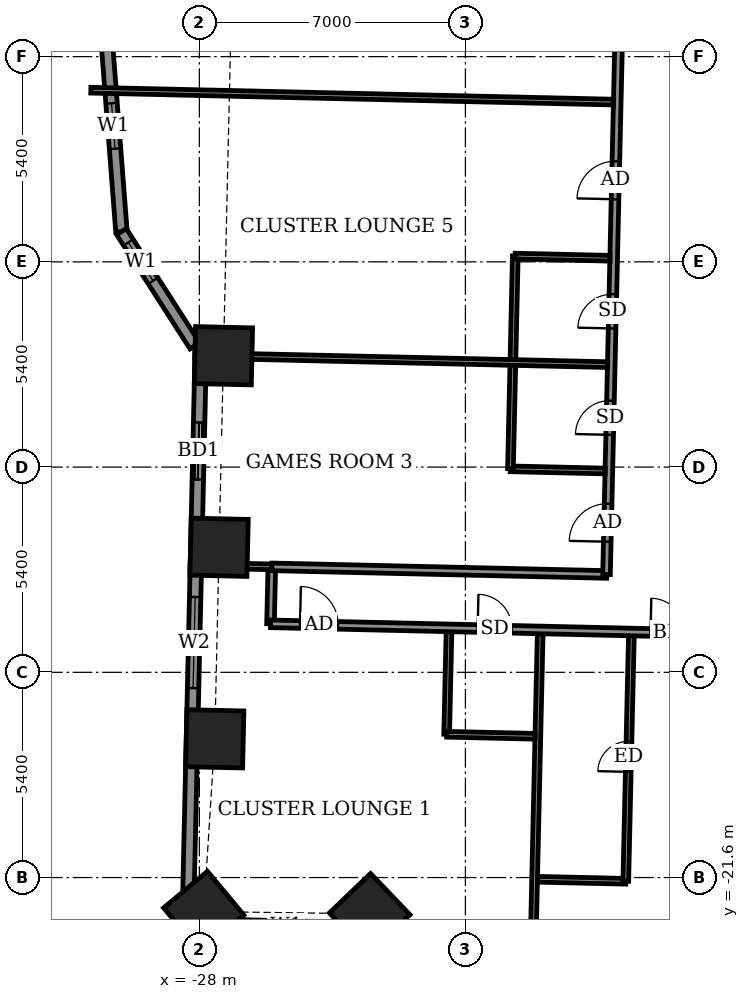
"""IFC4 building model, lengths in metres.
Left out: names, types, materials, properties, quantities, classifications, styles, units other than length and angle.
Written with IfcOpenShell. Run it as: python <this file> out.ifc"""

import sys

from ifc_helpers import new_model, si_unit, direction, frame, frame_2d, origin, origin_2d, place, context, subcontext, project, spatial, rectangle, extrude, element, fill, save


model = new_model("IFC4")
c1 = context("Model", 3, precision=1e-05, world=origin(), true_north=direction((0.0, 1.0)))
c2 = subcontext(c1, "Body", "Model", "MODEL_VIEW")
j1 = project(units=[si_unit("LENGTHUNIT", "METRE"), si_unit("PLANEANGLEUNIT", "RADIAN")], contexts=[c1])
p1 = place(None, origin())
s1 = spatial("IfcSite", under=j1, at=p1, CompositionType="ELEMENT")
p2 = place(p1, origin())
s2 = spatial("IfcBuilding", under=s1, at=p2, CompositionType="ELEMENT")
p3 = place(p2, frame((0.0, 0.0, 60.3)))
s3 = spatial("IfcBuildingStorey", under=s2, at=p3, CompositionType="ELEMENT", Elevation=60.3)
for number, where, z_axis, x_axis in (
    (1, (-27.366, -7.87, -0.55), (0.0, 0.0, 1.0), (-0.023, -1.0, 0.0)),
    (2, (-27.481, -12.91, -0.55), (0.0, 0.0, 1.0), (-0.023, -1.0, 0.0)),
    (3, (-27.595, -17.95, -0.55), (0.0, 0.0, 1.0), (-0.023, -1.0, 0.0)),
    (4, (-27.884, -22.494, -0.55), (0.0, 0.0, 1.0), (0.64, -0.768, 0.0)),
    (5, (-23.519, -22.555, -0.55), (0.0, 0.0, 1.0), (0.691, -0.723, 0.0)),
):
    element("IfcColumn", number, at=place(p3, frame(where, z_axis=z_axis, x_axis=x_axis)), inside=s3, PredefinedType="COLUMN", context=c2, shape_type="SweptSolid", body=[
        extrude(rectangle(XDim=1.5, YDim=1.5, at=origin_2d()), origin(), (0.0, 0.0, 1.0), 3.6),
    ])
p4 = place(p3, frame((-30.479, 0.952, 0.0), z_axis=(0.0, 0.0, 1.0), x_axis=(0.076964476481, -0.997033835614, 0.0)))
e6 = element("IfcWall", 6, at=p4, inside=s3, PredefinedType="SOLIDWALL", context=c2, shape_type="SweptSolid", body=[
    extrude(rectangle(XDim=5.573, YDim=0.3, at=frame_2d((2.787, 0.0))), origin(), (0.0, 0.0, 1.0), 3.05),
])
p5 = place(p4, frame((2.186, 0.0, 0.9)))
e7 = element("IfcOpeningElement", 7, at=p5, cuts=e6, PredefinedType="OPENING", context=c2, shape_type="SweptSolid", body=[
    extrude(rectangle(XDim=1.2, YDim=1.5, at=frame_2d((0.6, 0.75))), frame((0.0, 0.16, 0.0), z_axis=(0.0, -1.0, 0.0), x_axis=(1.0, 0.0, 0.0)), (0.0, 0.0, 1.0), 0.32),
])
p6 = place(p3, frame((-30.05, -4.605, 0.0), z_axis=(0.0, 0.0, 1.0), x_axis=(0.540653885242, -0.841245134532, 0.0)))
e8 = element("IfcWall", 8, at=p6, inside=s3, PredefinedType="SOLIDWALL", context=c2, shape_type="SweptSolid", body=[
    extrude(rectangle(XDim=3.57, YDim=0.3, at=frame_2d((1.785, 0.0))), origin(), (0.0, 0.0, 1.0), 3.05),
])
p7 = place(p6, frame((0.338, 0.0, 0.9)))
e9 = element("IfcOpeningElement", 9, at=p7, cuts=e8, PredefinedType="OPENING", context=c2, shape_type="SweptSolid", body=[
    extrude(rectangle(XDim=1.2, YDim=1.5, at=frame_2d((0.6, 0.75))), frame((0.0, 0.16, 0.0), z_axis=(0.0, -1.0, 0.0), x_axis=(1.0, 0.0, 0.0)), (0.0, 0.0, 1.0), 0.32),
])
p8 = place(p3, frame((-27.965, -7.802, 0.0), z_axis=(0.0, 0.0, 1.0), x_axis=(-0.02267786199, -0.999742824218, 0.0)))
e10 = element("IfcWall", 10, at=p8, inside=s3, PredefinedType="SOLIDWALL", context=c2, shape_type="SweptSolid", body=[
    extrude(rectangle(XDim=15.029, YDim=0.3, at=frame_2d((7.514, 0.0))), origin(), (0.0, 0.0, 1.0), 3.05),
])
p9 = place(p8, frame((1.826, 0.0, 0.0)))
e11 = element("IfcOpeningElement", 11, at=p9, cuts=e10, PredefinedType="OPENING", context=c2, shape_type="SweptSolid", body=[
    extrude(rectangle(XDim=1.5, YDim=2.4, at=frame_2d((0.75, 1.2))), frame((0.0, 0.16, 0.0), z_axis=(0.0, -1.0, 0.0), x_axis=(1.0, 0.0, 0.0)), (0.0, 0.0, 1.0), 0.32),
])
p10 = place(p8, frame((6.417, 0.0, 0.9)))
e12 = element("IfcOpeningElement", 12, at=p10, cuts=e10, PredefinedType="OPENING", context=c2, shape_type="SweptSolid", body=[
    extrude(rectangle(XDim=2.4, YDim=1.5, at=frame_2d((1.2, 0.75))), frame((0.0, 0.16, 0.0), z_axis=(0.0, -1.0, 0.0), x_axis=(1.0, 0.0, 0.0)), (0.0, 0.0, 1.0), 0.32),
])
p11 = place(p3, frame((-28.306, -22.827, 0.0), z_axis=(0.0, 0.0, 1.0), x_axis=(0.999741204967, -0.022749133868, 0.0)))
e13 = element("IfcWall", 13, at=p11, inside=s3, PredefinedType="SOLIDWALL", context=c2, shape_type="SweptSolid", body=[
    extrude(rectangle(XDim=4.4, YDim=0.3, at=frame_2d((2.2, 0.0))), origin(), (0.0, 0.0, 1.0), 3.05),
])
p12 = place(p11, frame((1.996, 0.0, 0.9)))
e14 = element("IfcOpeningElement", 14, at=p12, cuts=e13, PredefinedType="OPENING", context=c2, shape_type="SweptSolid", body=[
    extrude(rectangle(XDim=1.2, YDim=1.5, at=frame_2d((0.6, 0.75))), frame((0.0, 0.16, 0.0), z_axis=(0.0, -1.0, 0.0), x_axis=(1.0, 0.0, 0.0)), (0.0, 0.0, 1.0), 0.32),
])
p13 = place(p3, frame((-30.802, -10.917, 0.0), z_axis=(0.0, 0.0, 1.0), x_axis=(0.022929749512, 0.99973707873, 0.0)))
e15 = element("IfcWall", 15, at=p13, inside=s3, PredefinedType="USERDEFINED", context=c2, shape_type="SweptSolid", body=[
    extrude(rectangle(XDim=2.875, YDim=0.55, at=frame_2d((1.438, 0.0))), origin(), (0.0, 0.0, 1.0), 0.8),
])
p14 = place(p3, frame((-19.307, -27.283, 0.0), z_axis=(0.0, 0.0, 1.0), x_axis=(0.022717280737, 0.999741929278, 0.0)))
e16 = element("IfcWall", 16, at=p14, inside=s3, PredefinedType="PARTITIONING", context=c2, shape_type="SweptSolid", body=[
    extrude(rectangle(XDim=12.101, YDim=0.15, at=frame_2d((6.051, 0.0))), origin(), (0.0, 0.0, 1.0), 2.55),
])
p15 = place(p3, frame((-19.102, -21.645, 0.0), z_axis=(0.0, 0.0, 1.0), x_axis=(0.999740260747, -0.02279059109, 0.0)))
e17 = element("IfcWall", 17, at=p15, inside=s3, PredefinedType="PARTITIONING", context=c2, shape_type="SweptSolid", body=[
    extrude(rectangle(XDim=2.324, YDim=0.15, at=frame_2d((1.162, 0.0))), origin(), (0.0, 0.0, 1.0), 3.05),
])
p16 = place(p3, frame((-16.78, -21.698, 0.0), z_axis=(0.0, 0.0, 1.0), x_axis=(0.022752312182, 0.999741132639, 0.0)))
e18 = element("IfcWall", 18, at=p16, inside=s3, PredefinedType="PARTITIONING", context=c2, shape_type="SweptSolid", body=[
    extrude(rectangle(XDim=6.46, YDim=0.15, at=frame_2d((3.23, 0.0))), origin(), (0.0, 0.0, 1.0), 3.05),
])
p17 = place(p16, frame((2.88, 0.0, 0.0)))
e19 = element("IfcOpeningElement", 19, at=p17, cuts=e18, PredefinedType="OPENING", context=c2, shape_type="SweptSolid", body=[
    extrude(rectangle(XDim=0.8, YDim=2.1, at=frame_2d((0.4, 1.05))), frame((0.0, 0.085, 0.0), z_axis=(0.0, -1.0, 0.0), x_axis=(1.0, 0.0, 0.0)), (0.0, 0.0, 1.0), 0.17),
])
p18 = place(p3, frame((-21.493, -17.83, 0.0), z_axis=(0.0, 0.0, 1.0), x_axis=(0.02260842146, 0.999744396973, 0.0)))
e20 = element("IfcWall", 20, at=p18, inside=s3, PredefinedType="PARTITIONING", context=c2, shape_type="SweptSolid", body=[
    extrude(rectangle(XDim=2.7, YDim=0.15, at=frame_2d((1.35, 0.0))), origin(), (0.0, 0.0, 1.0), 3.05),
])
p19 = place(p3, frame((-21.491, -17.83, 0.0), z_axis=(0.0, 0.0, 1.0), x_axis=(0.999740260747, -0.02279059109, 0.0)))
e21 = element("IfcWall", 21, at=p19, inside=s3, PredefinedType="PARTITIONING", context=c2, shape_type="SweptSolid", body=[
    extrude(rectangle(XDim=2.324, YDim=0.15, at=frame_2d((1.162, 0.0))), origin(), (0.0, 0.0, 1.0), 3.05),
])
p20 = place(p3, frame((-26.128, -14.924, 0.0), z_axis=(0.0, 0.0, 1.0), x_axis=(0.022632637625, 0.99974384905, 0.0)))
e22 = element("IfcWall", 22, at=p20, inside=s3, PredefinedType="PARTITIONING", context=c2, shape_type="SweptSolid", body=[
    extrude(rectangle(XDim=1.5, YDim=0.2, at=frame_2d((0.75, 0.0))), origin(), (0.0, 0.0, 1.0), 3.05),
])
p21 = place(p3, frame((-26.126, -14.924, 0.0), z_axis=(0.0, 0.0, 1.0), x_axis=(0.999742687583, -0.0226838847, 0.0)))
e23 = element("IfcWall", 23, at=p21, inside=s3, PredefinedType="PARTITIONING", context=c2, shape_type="SweptSolid", body=[
    extrude(rectangle(XDim=54.836, YDim=0.2, at=frame_2d((27.418, 0.0))), origin(), (0.0, 0.0, 1.0), 3.05),
])
p22 = place(p21, frame((0.775, 0.0, 0.0)))
e24 = element("IfcOpeningElement", 24, at=p22, cuts=e23, PredefinedType="OPENING", context=c2, shape_type="SweptSolid", body=[
    extrude(rectangle(XDim=1.0, YDim=2.1, at=frame_2d((0.5, 1.05))), frame((0.0, 0.11, 0.0), z_axis=(0.0, -1.0, 0.0), x_axis=(1.0, 0.0, 0.0)), (0.0, 0.0, 1.0), 0.22),
])
p23 = place(p21, frame((5.45, 0.0, 0.0)))
e25 = element("IfcOpeningElement", 25, at=p23, cuts=e23, PredefinedType="OPENING", context=c2, shape_type="SweptSolid", body=[
    extrude(rectangle(XDim=0.9, YDim=2.1, at=frame_2d((0.45, 1.05))), frame((0.0, 0.11, 0.0), z_axis=(0.0, -1.0, 0.0), x_axis=(1.0, 0.0, 0.0)), (0.0, 0.0, 1.0), 0.22),
])
p24 = place(p21, frame((10.0, 0.0, 0.0)))
e26 = element("IfcOpeningElement", 26, at=p24, cuts=e23, PredefinedType="OPENING", context=c2, shape_type="SweptSolid", body=[
    extrude(rectangle(XDim=0.9, YDim=2.1, at=frame_2d((0.45, 1.05))), frame((0.0, 0.11, 0.0), z_axis=(0.0, -1.0, 0.0), x_axis=(1.0, 0.0, 0.0)), (0.0, 0.0, 1.0), 0.22),
])
p25 = place(p21, frame((11.975, 0.0, 0.0)))
e27 = element("IfcOpeningElement", 27, at=p25, cuts=e23, PredefinedType="OPENING", context=c2, shape_type="SweptSolid", body=[
    extrude(rectangle(XDim=0.9, YDim=2.1, at=frame_2d((0.45, 1.05))), frame((0.0, 0.11, 0.0), z_axis=(0.0, -1.0, 0.0), x_axis=(1.0, 0.0, 0.0)), (0.0, 0.0, 1.0), 0.22),
])
p26 = place(p21, frame((18.85, 0.0, 0.0)))
e28 = element("IfcOpeningElement", 28, at=p26, cuts=e23, PredefinedType="OPENING", context=c2, shape_type="SweptSolid", body=[
    extrude(rectangle(XDim=0.9, YDim=2.1, at=frame_2d((0.45, 1.05))), frame((0.0, 0.11, 0.0), z_axis=(0.0, -1.0, 0.0), x_axis=(1.0, 0.0, 0.0)), (0.0, 0.0, 1.0), 0.22),
])
p27 = place(p21, frame((20.9, 0.0, 0.0)))
e29 = element("IfcOpeningElement", 29, at=p27, cuts=e23, PredefinedType="OPENING", context=c2, shape_type="SweptSolid", body=[
    extrude(rectangle(XDim=0.9, YDim=2.1, at=frame_2d((0.45, 1.05))), frame((0.0, 0.11, 0.0), z_axis=(0.0, -1.0, 0.0), x_axis=(1.0, 0.0, 0.0)), (0.0, 0.0, 1.0), 0.22),
])
p28 = place(p21, frame((27.725, 0.0, 0.0)))
e30 = element("IfcOpeningElement", 30, at=p28, cuts=e23, PredefinedType="OPENING", context=c2, shape_type="SweptSolid", body=[
    extrude(rectangle(XDim=0.9, YDim=2.1, at=frame_2d((0.45, 1.05))), frame((0.0, 0.11, 0.0), z_axis=(0.0, -1.0, 0.0), x_axis=(1.0, 0.0, 0.0)), (0.0, 0.0, 1.0), 0.22),
])
p29 = place(p21, frame((29.7, 0.0, 0.0)))
e31 = element("IfcOpeningElement", 31, at=p29, cuts=e23, PredefinedType="OPENING", context=c2, shape_type="SweptSolid", body=[
    extrude(rectangle(XDim=0.9, YDim=2.1, at=frame_2d((0.45, 1.05))), frame((0.0, 0.11, 0.0), z_axis=(0.0, -1.0, 0.0), x_axis=(1.0, 0.0, 0.0)), (0.0, 0.0, 1.0), 0.22),
])
p30 = place(p21, frame((36.5, 0.0, 0.0)))
e32 = element("IfcOpeningElement", 32, at=p30, cuts=e23, PredefinedType="OPENING", context=c2, shape_type="SweptSolid", body=[
    extrude(rectangle(XDim=0.9, YDim=2.1, at=frame_2d((0.45, 1.05))), frame((0.0, 0.11, 0.0), z_axis=(0.0, -1.0, 0.0), x_axis=(1.0, 0.0, 0.0)), (0.0, 0.0, 1.0), 0.22),
])
p31 = place(p21, frame((38.525, 0.0, 0.0)))
e33 = element("IfcOpeningElement", 33, at=p31, cuts=e23, PredefinedType="OPENING", context=c2, shape_type="SweptSolid", body=[
    extrude(rectangle(XDim=0.9, YDim=2.1, at=frame_2d((0.45, 1.05))), frame((0.0, 0.11, 0.0), z_axis=(0.0, -1.0, 0.0), x_axis=(1.0, 0.0, 0.0)), (0.0, 0.0, 1.0), 0.22),
])
p32 = place(p21, frame((45.325, 0.0, 0.0)))
e34 = element("IfcOpeningElement", 34, at=p32, cuts=e23, PredefinedType="OPENING", context=c2, shape_type="SweptSolid", body=[
    extrude(rectangle(XDim=0.9, YDim=2.1, at=frame_2d((0.45, 1.05))), frame((0.0, 0.11, 0.0), z_axis=(0.0, -1.0, 0.0), x_axis=(1.0, 0.0, 0.0)), (0.0, 0.0, 1.0), 0.22),
])
p33 = place(p21, frame((52.593, 0.0, 0.0)))
e35 = element("IfcOpeningElement", 35, at=p33, cuts=e23, PredefinedType="OPENING", context=c2, shape_type="SweptSolid", body=[
    extrude(rectangle(XDim=1.0, YDim=2.1, at=frame_2d((0.5, 1.05))), frame((0.0, 0.11, 0.0), z_axis=(0.0, -1.0, 0.0), x_axis=(1.0, 0.0, 0.0)), (0.0, 0.0, 1.0), 0.22),
])
p34 = place(p21, frame((47.55, 0.0, 0.0)))
e36 = element("IfcOpeningElement", 36, at=p34, cuts=e23, PredefinedType="OPENING", context=c2, shape_type="SweptSolid", body=[
    extrude(rectangle(XDim=0.9, YDim=2.1, at=frame_2d((0.45, 1.05))), frame((0.0, 0.11, 0.0), z_axis=(0.0, -1.0, 0.0), x_axis=(1.0, 0.0, 0.0)), (0.0, 0.0, 1.0), 0.22),
])
p35 = place(p3, frame((-28.242, -13.376, 0.0), z_axis=(0.0, 0.0, 1.0), x_axis=(0.999739603527, -0.022819402715, 0.0)))
e37 = element("IfcWall", 37, at=p35, inside=s3, PredefinedType="PARTITIONING", context=c2, shape_type="SweptSolid", body=[
    extrude(rectangle(XDim=2.15, YDim=0.15, at=frame_2d((1.075, 0.0))), origin(), (0.0, 0.0, 1.0), 3.05),
])
p36 = place(p3, frame((-26.092, -13.425, 0.0), z_axis=(0.0, 0.0, 1.0), x_axis=(0.999742550188, -0.022689939273, 0.0)))
e38 = element("IfcWall", 38, at=p36, inside=s3, PredefinedType="PARTITIONING", context=c2, shape_type="SweptSolid", body=[
    extrude(rectangle(XDim=8.812, YDim=0.2, at=frame_2d((4.406, 0.0))), origin(), (0.0, 0.0, 1.0), 3.05),
])
p37 = place(p3, frame((-17.287, -13.625, 0.0), z_axis=(0.0, 0.0, 1.0), x_axis=(0.022712214871, 0.999742044377, 0.0)))
e39 = element("IfcWall", 39, at=p37, inside=s3, PredefinedType="PARTITIONING", context=c2, shape_type="SweptSolid", body=[
    extrude(rectangle(XDim=26.551, YDim=0.2, at=frame_2d((13.275, 0.0))), origin(), (0.0, 0.0, 1.0), 3.05),
])
p38 = place(p37, frame((14.15, 0.0, 0.0)))
e40 = element("IfcOpeningElement", 40, at=p38, cuts=e39, PredefinedType="OPENING", context=c2, shape_type="SweptSolid", body=[
    extrude(rectangle(XDim=1.0, YDim=2.1, at=frame_2d((0.5, 1.05))), frame((0.0, 0.11, 0.0), z_axis=(0.0, -1.0, 0.0), x_axis=(1.0, 0.0, 0.0)), (0.0, 0.0, 1.0), 0.22),
])
p39 = place(p37, frame((17.625, 0.0, 0.0)))
e41 = element("IfcOpeningElement", 41, at=p39, cuts=e39, PredefinedType="OPENING", context=c2, shape_type="SweptSolid", body=[
    extrude(rectangle(XDim=0.9, YDim=2.1, at=frame_2d((0.45, 1.05))), frame((0.0, 0.11, 0.0), z_axis=(0.0, -1.0, 0.0), x_axis=(1.0, 0.0, 0.0)), (0.0, 0.0, 1.0), 0.22),
])
p40 = place(p37, frame((9.875, 0.0, 0.0)))
e42 = element("IfcOpeningElement", 42, at=p40, cuts=e39, PredefinedType="OPENING", context=c2, shape_type="SweptSolid", body=[
    extrude(rectangle(XDim=1.0, YDim=2.1, at=frame_2d((0.5, 1.05))), frame((0.0, 0.11, 0.0), z_axis=(0.0, -1.0, 0.0), x_axis=(1.0, 0.0, 0.0)), (0.0, 0.0, 1.0), 0.22),
])
p41 = place(p37, frame((6.475, 0.0, 0.0)))
e43 = element("IfcOpeningElement", 43, at=p41, cuts=e39, PredefinedType="OPENING", context=c2, shape_type="SweptSolid", body=[
    extrude(rectangle(XDim=0.9, YDim=2.1, at=frame_2d((0.45, 1.05))), frame((0.0, 0.11, 0.0), z_axis=(0.0, -1.0, 0.0), x_axis=(1.0, 0.0, 0.0)), (0.0, 0.0, 1.0), 0.22),
])
p42 = place(p37, frame((0.862, 0.0, 0.0)))
e44 = element("IfcOpeningElement", 44, at=p42, cuts=e39, PredefinedType="OPENING", context=c2, shape_type="SweptSolid", body=[
    extrude(rectangle(XDim=1.0, YDim=2.1, at=frame_2d((0.5, 1.05))), frame((0.0, 0.11, 0.0), z_axis=(0.0, -1.0, 0.0), x_axis=(1.0, 0.0, 0.0)), (0.0, 0.0, 1.0), 0.22),
])
p43 = place(p37, frame((3.675, 0.0, 0.0)))
e45 = element("IfcOpeningElement", 45, at=p43, cuts=e39, PredefinedType="OPENING", context=c2, shape_type="SweptSolid", body=[
    extrude(rectangle(XDim=0.9, YDim=2.1, at=frame_2d((0.45, 1.05))), frame((0.0, 0.11, 0.0), z_axis=(0.0, -1.0, 0.0), x_axis=(1.0, 0.0, 0.0)), (0.0, 0.0, 1.0), 0.22),
])
p44 = place(p3, frame((-19.819, -10.846, 0.0), z_axis=(0.0, 0.0, 1.0), x_axis=(0.999738801317, -0.022854521249, 0.0)))
e46 = element("IfcWall", 46, at=p44, inside=s3, PredefinedType="PARTITIONING", context=c2, shape_type="SweptSolid", body=[
    extrude(rectangle(XDim=2.5, YDim=0.15, at=frame_2d((1.25, 0.0))), origin(), (0.0, 0.0, 1.0), 3.05),
])
p45 = place(p3, frame((-19.814, -10.842, 0.0), z_axis=(0.0, 0.0, 1.0), x_axis=(0.022667933447, 0.999743049385, 0.0)))
e47 = element("IfcWall", 47, at=p45, inside=s3, PredefinedType="PARTITIONING", context=c2, shape_type="SweptSolid", body=[
    extrude(rectangle(XDim=5.601, YDim=0.15, at=frame_2d((2.8, 0.0))), origin(), (0.0, 0.0, 1.0), 3.05),
])
p46 = place(p3, frame((-28.116, -7.857, 0.0), z_axis=(0.0, 0.0, 1.0), x_axis=(0.999741301527, -0.022744890004, 0.0)))
e48 = element("IfcWall", 48, at=p46, inside=s3, PredefinedType="PARTITIONING", context=c2, shape_type="SweptSolid", body=[
    extrude(rectangle(XDim=10.863, YDim=0.15, at=frame_2d((5.431, 0.0))), origin(), (0.0, 0.0, 1.0), 3.05),
])
p47 = place(p3, frame((-19.692, -5.248, 0.0), z_axis=(0.0, 0.0, 1.0), x_axis=(0.999740977561, -0.022759125332, 0.0)))
e49 = element("IfcWall", 49, at=p47, inside=s3, PredefinedType="PARTITIONING", context=c2, shape_type="SweptSolid", body=[
    extrude(rectangle(XDim=2.5, YDim=0.15, at=frame_2d((1.25, 0.0))), origin(), (0.0, 0.0, 1.0), 3.05),
])
p48 = place(p3, frame((-30.856, -0.883, 0.0), z_axis=(0.0, 0.0, 1.0), x_axis=(0.999741248952, -0.022747200787, 0.0)))
e50 = element("IfcWall", 50, at=p48, inside=s3, PredefinedType="PARTITIONING", context=c2, shape_type="SweptSolid", body=[
    extrude(rectangle(XDim=13.76, YDim=0.15, at=frame_2d((6.88, 0.0))), origin(), (0.0, 0.0, 1.0), 2.05),
])
p49 = place(p5, origin())
e51 = element("IfcWindow", 51, at=p49, inside=s3, PartitioningType="SINGLE_PANEL", PredefinedType="WINDOW", context=c2, shape_type="SweptSolid", body=[
    extrude(rectangle(XDim=1.2, YDim=1.5, at=frame_2d((0.6, 0.75))), frame((0.0, 0.03, 0.0), z_axis=(0.0, -1.0, 0.0), x_axis=(1.0, 0.0, 0.0)), (0.0, 0.0, 1.0), 0.06),
])
fill(e7, e51)
p50 = place(p7, origin())
e52 = element("IfcWindow", 52, at=p50, inside=s3, PartitioningType="SINGLE_PANEL", PredefinedType="WINDOW", context=c2, shape_type="SweptSolid", body=[
    extrude(rectangle(XDim=1.2, YDim=1.5, at=frame_2d((0.6, 0.75))), frame((0.0, 0.03, 0.0), z_axis=(0.0, -1.0, 0.0), x_axis=(1.0, 0.0, 0.0)), (0.0, 0.0, 1.0), 0.06),
])
fill(e9, e52)
p51 = place(p9, origin())
e53 = element("IfcDoor", 53, at=p51, inside=s3, OperationType="SLIDING_TO_LEFT", PredefinedType="DOOR", context=c2, shape_type="SweptSolid", body=[
    extrude(rectangle(XDim=1.5, YDim=2.4, at=frame_2d((0.75, 1.2))), frame((0.0, 0.025, 0.0), z_axis=(0.0, -1.0, 0.0), x_axis=(1.0, 0.0, 0.0)), (0.0, 0.0, 1.0), 0.05),
])
fill(e11, e53)
p52 = place(p10, origin())
e54 = element("IfcWindow", 54, at=p52, inside=s3, PartitioningType="DOUBLE_PANEL_VERTICAL", PredefinedType="WINDOW", context=c2, shape_type="SweptSolid", body=[
    extrude(rectangle(XDim=2.4, YDim=1.5, at=frame_2d((1.2, 0.75))), frame((0.0, 0.03, 0.0), z_axis=(0.0, -1.0, 0.0), x_axis=(1.0, 0.0, 0.0)), (0.0, 0.0, 1.0), 0.06),
])
fill(e12, e54)
p53 = place(p22, origin())
e55 = element("IfcDoor", 55, at=p53, inside=s3, OperationType="SINGLE_SWING_LEFT", PredefinedType="DOOR", context=c2, shape_type="SweptSolid", body=[
    extrude(rectangle(XDim=1.0, YDim=2.1, at=frame_2d((0.5, 1.05))), frame((0.0, 0.025, 0.0), z_axis=(0.0, -1.0, 0.0), x_axis=(1.0, 0.0, 0.0)), (0.0, 0.0, 1.0), 0.05),
])
fill(e24, e55)
p54 = place(p23, origin())
e56 = element("IfcDoor", 56, at=p54, inside=s3, OperationType="SINGLE_SWING_LEFT", PredefinedType="DOOR", context=c2, shape_type="SweptSolid", body=[
    extrude(rectangle(XDim=0.9, YDim=2.1, at=frame_2d((0.45, 1.05))), frame((0.0, 0.025, 0.0), z_axis=(0.0, -1.0, 0.0), x_axis=(1.0, 0.0, 0.0)), (0.0, 0.0, 1.0), 0.05),
])
fill(e25, e56)
p55 = place(p24, origin())
e57 = element("IfcDoor", 57, at=p55, inside=s3, OperationType="SINGLE_SWING_LEFT", PredefinedType="DOOR", context=c2, shape_type="SweptSolid", body=[
    extrude(rectangle(XDim=0.9, YDim=2.1, at=frame_2d((0.45, 1.05))), frame((0.0, 0.025, 0.0), z_axis=(0.0, -1.0, 0.0), x_axis=(1.0, 0.0, 0.0)), (0.0, 0.0, 1.0), 0.05),
])
fill(e26, e57)
p56 = place(p17, origin())
e58 = element("IfcDoor", 58, at=p56, inside=s3, OperationType="SINGLE_SWING_LEFT", PredefinedType="DOOR", context=c2, shape_type="SweptSolid", body=[
    extrude(rectangle(XDim=0.8, YDim=2.1, at=frame_2d((0.4, 1.05))), frame((0.0, 0.025, 0.0), z_axis=(0.0, -1.0, 0.0), x_axis=(1.0, 0.0, 0.0)), (0.0, 0.0, 1.0), 0.05),
])
fill(e19, e58)
p57 = place(p40, origin())
e59 = element("IfcDoor", 59, at=p57, inside=s3, OperationType="SINGLE_SWING_LEFT", PredefinedType="DOOR", context=c2, shape_type="SweptSolid", body=[
    extrude(rectangle(XDim=1.0, YDim=2.1, at=frame_2d((0.5, 1.05))), frame((0.0, 0.025, 0.0), z_axis=(0.0, -1.0, 0.0), x_axis=(1.0, 0.0, 0.0)), (0.0, 0.0, 1.0), 0.05),
])
fill(e42, e59)
p58 = place(p41, origin())
e60 = element("IfcDoor", 60, at=p58, inside=s3, OperationType="SINGLE_SWING_RIGHT", PredefinedType="DOOR", context=c2, shape_type="SweptSolid", body=[
    extrude(rectangle(XDim=0.9, YDim=2.1, at=frame_2d((0.45, 1.05))), frame((0.0, 0.025, 0.0), z_axis=(0.0, -1.0, 0.0), x_axis=(1.0, 0.0, 0.0)), (0.0, 0.0, 1.0), 0.05),
])
fill(e43, e60)
p59 = place(p42, origin())
e61 = element("IfcDoor", 61, at=p59, inside=s3, OperationType="SINGLE_SWING_RIGHT", PredefinedType="DOOR", context=c2, shape_type="SweptSolid", body=[
    extrude(rectangle(XDim=1.0, YDim=2.1, at=frame_2d((0.5, 1.05))), frame((0.0, 0.025, 0.0), z_axis=(0.0, -1.0, 0.0), x_axis=(1.0, 0.0, 0.0)), (0.0, 0.0, 1.0), 0.05),
])
fill(e44, e61)
p60 = place(p43, origin())
e62 = element("IfcDoor", 62, at=p60, inside=s3, OperationType="SINGLE_SWING_LEFT", PredefinedType="DOOR", context=c2, shape_type="SweptSolid", body=[
    extrude(rectangle(XDim=0.9, YDim=2.1, at=frame_2d((0.45, 1.05))), frame((0.0, 0.025, 0.0), z_axis=(0.0, -1.0, 0.0), x_axis=(1.0, 0.0, 0.0)), (0.0, 0.0, 1.0), 0.05),
])
fill(e45, e62)
save(model, sys.argv[1])
